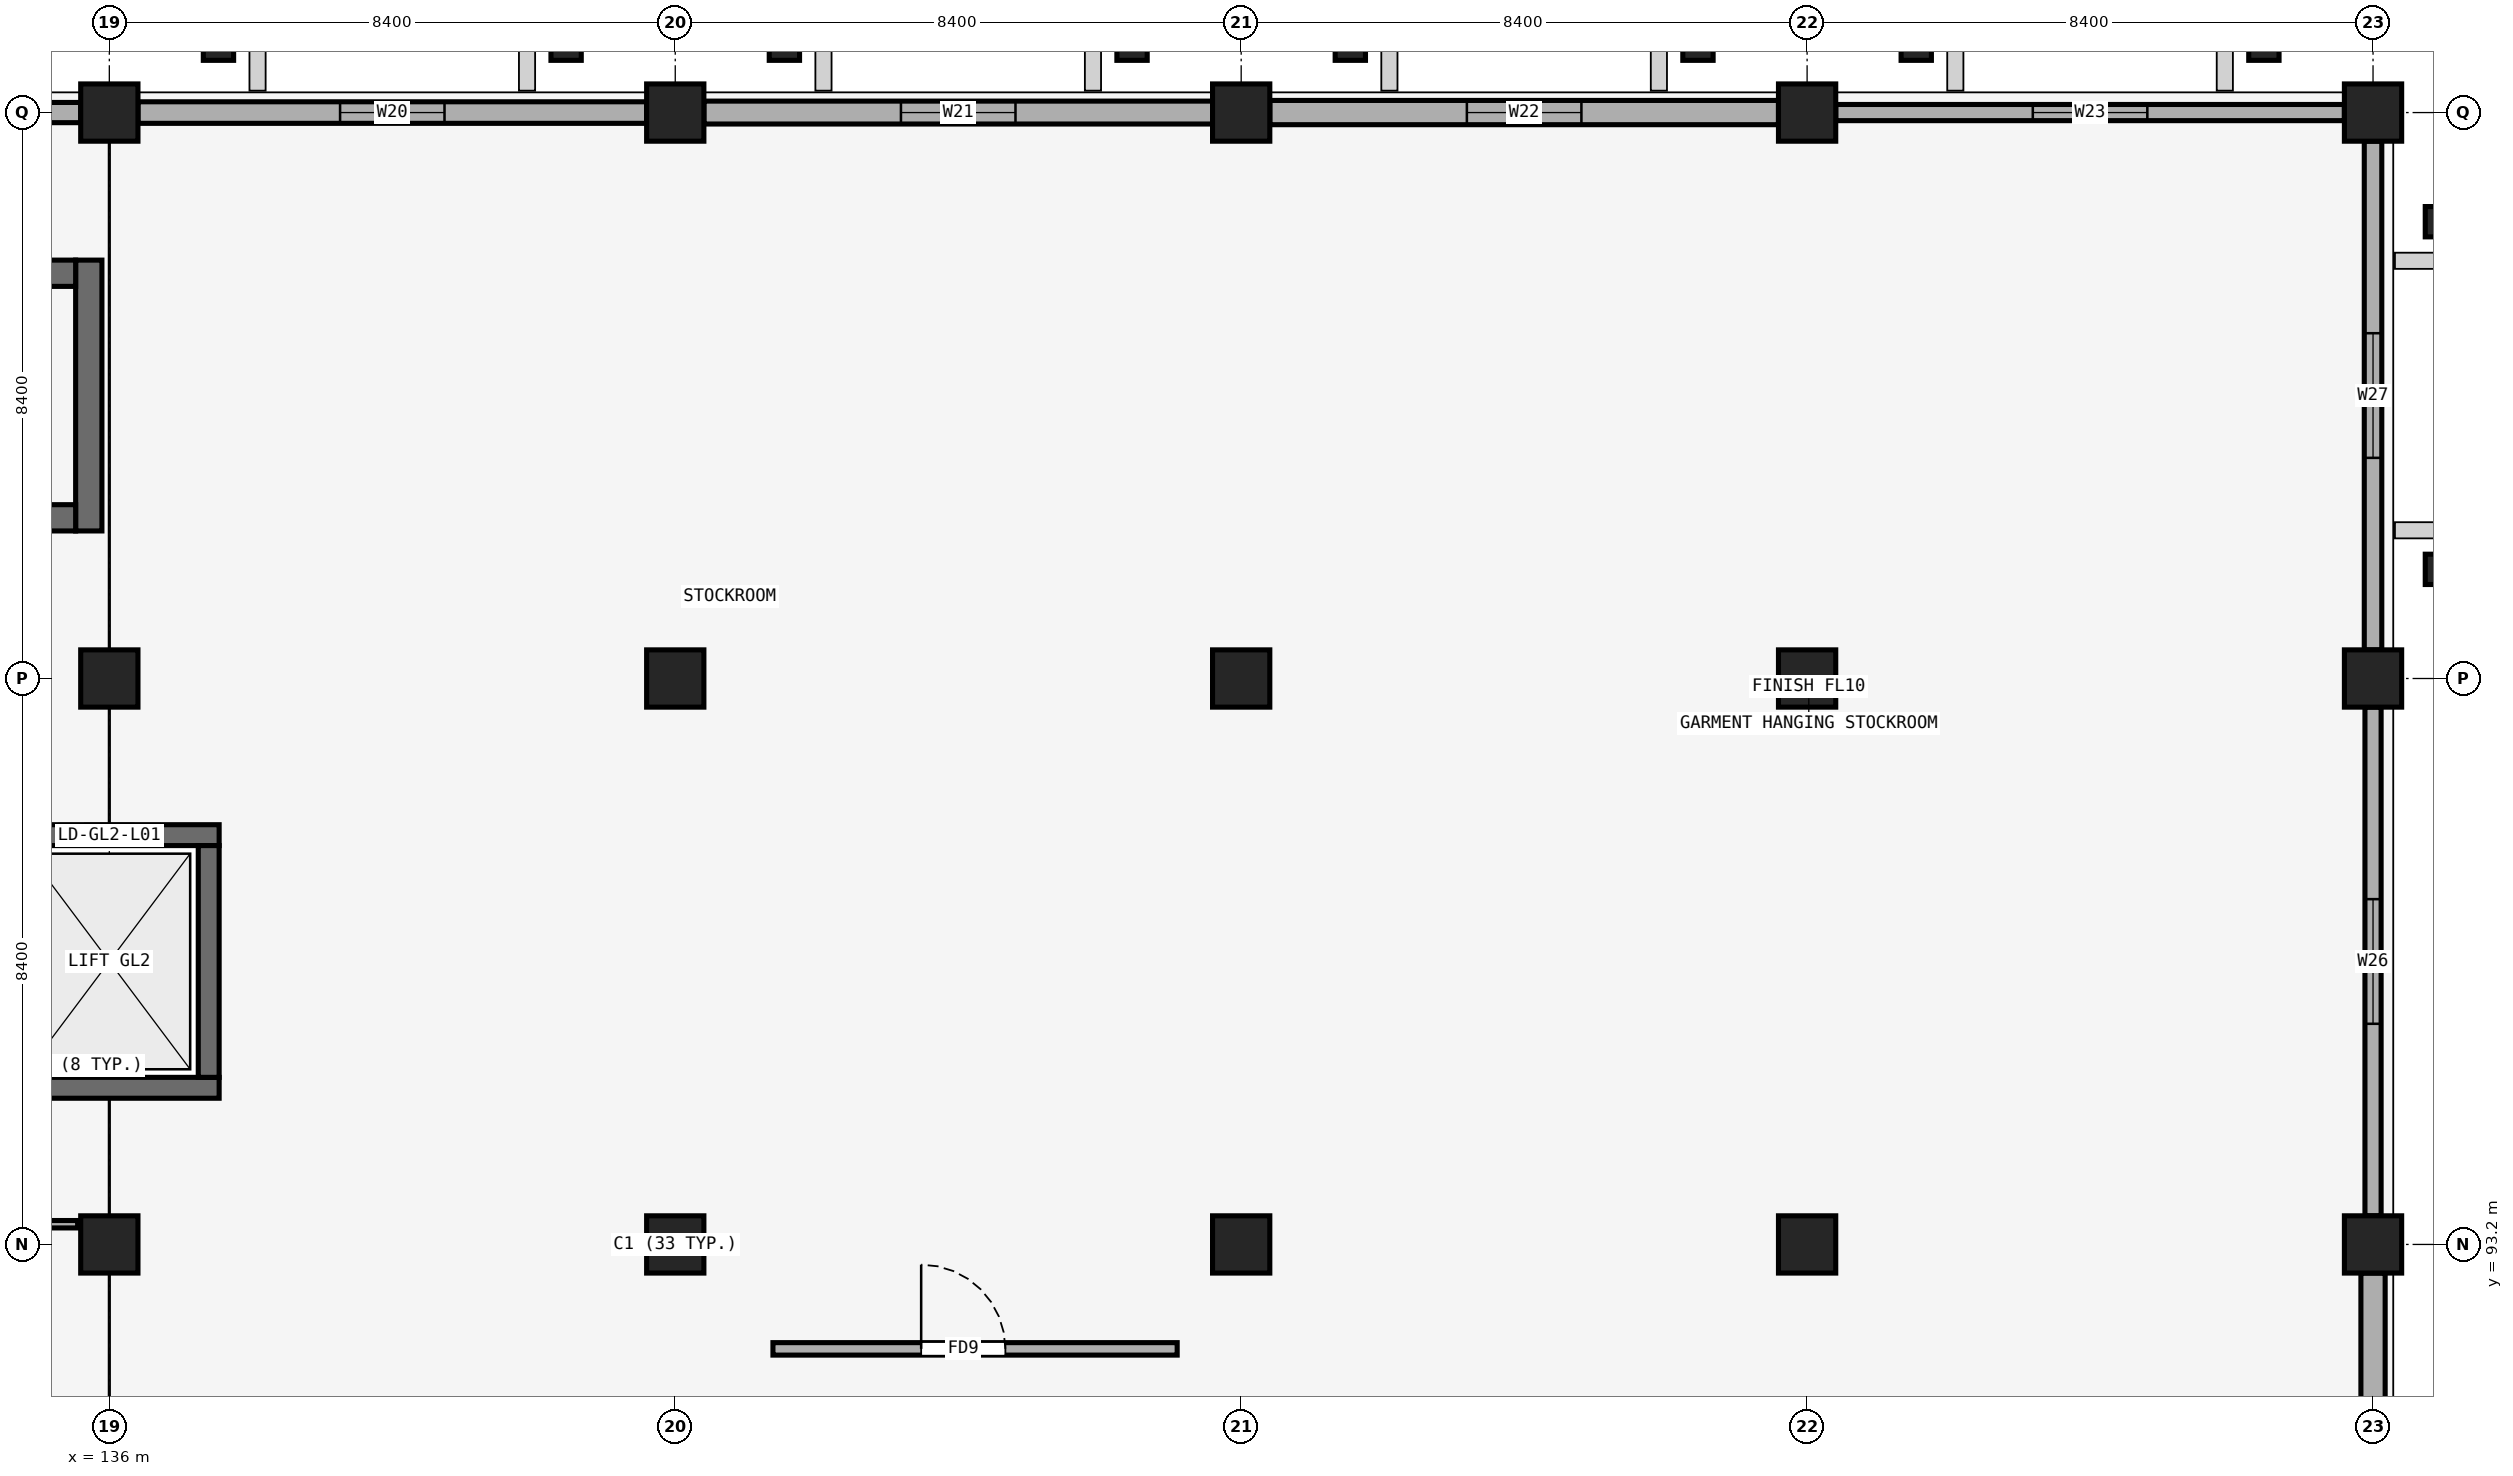
"""IFC4 building model, lengths in metres.
Left out: names, types, materials, properties, quantities, classifications, styles, units other than length and angle.
Written with IfcOpenShell. Run it as: python <this file> out.ifc"""

import sys

from ifc_helpers import new_model, si_unit, direction, frame, frame_2d, origin, origin_2d, place, context, subcontext, project, spatial, rectangle, extrude, element, fill, save


model = new_model("IFC4")
c1 = context("Model", 3, precision=1e-05, world=origin(), true_north=direction((0.0, 1.0)))
c2 = subcontext(c1, "Body", "Model", "MODEL_VIEW")
j1 = project(units=[si_unit("LENGTHUNIT", "METRE"), si_unit("PLANEANGLEUNIT", "RADIAN")], contexts=[c1])
p1 = place(None, origin())
s1 = spatial("IfcSite", under=j1, at=p1, CompositionType="ELEMENT")
p2 = place(p1, origin())
s2 = spatial("IfcBuilding", under=s1, at=p2, CompositionType="ELEMENT")
p3 = place(p2, frame((0.0, 0.0, 5.4)))
s3 = spatial("IfcBuildingStorey", under=s2, at=p3, CompositionType="ELEMENT", Elevation=5.4)
for number, where, z_axis, x_axis in (
    (1, (136.0, 93.2, 0.0), (0.0, 0.0, 1.0), (1.0, 0.0, 0.0)),
    (2, (144.4, 93.2, 0.0), (0.0, 0.0, 1.0), (1.0, 0.0, 0.0)),
    (3, (152.8, 93.2, 0.0), (0.0, 0.0, 1.0), (1.0, 0.0, 0.0)),
    (4, (161.2, 93.2, 0.0), (0.0, 0.0, 1.0), (1.0, 0.0, 0.0)),
    (5, (169.6, 93.2, 0.0), (0.0, 0.0, 1.0), (1.0, 0.0, 0.0)),
    (6, (136.0, 101.6, 0.0), (0.0, 0.0, 1.0), (1.0, 0.0, 0.0)),
    (7, (144.4, 101.6, 0.0), (0.0, 0.0, 1.0), (1.0, 0.0, 0.0)),
    (8, (152.8, 101.6, 0.0), (0.0, 0.0, 1.0), (1.0, 0.0, 0.0)),
    (9, (161.2, 101.6, 0.0), (0.0, 0.0, 1.0), (1.0, 0.0, 0.0)),
    (10, (169.6, 101.6, 0.0), (0.0, 0.0, 1.0), (1.0, 0.0, 0.0)),
    (11, (136.0, 110.0, 0.0), (0.0, 0.0, 1.0), (1.0, 0.0, 0.0)),
    (12, (144.4, 110.0, 0.0), (0.0, 0.0, 1.0), (1.0, 0.0, 0.0)),
    (13, (152.8, 110.0, 0.0), (0.0, 0.0, 1.0), (1.0, 0.0, 0.0)),
    (14, (161.2, 110.0, 0.0), (0.0, 0.0, 1.0), (1.0, 0.0, 0.0)),
    (15, (169.6, 110.0, 0.0), (0.0, 0.0, 1.0), (1.0, 0.0, 0.0)),
):
    element("IfcColumn", number, at=place(p3, frame(where, z_axis=z_axis, x_axis=x_axis)), inside=s3, PredefinedType="COLUMN", context=c2, shape_type="SweptSolid", body=[
        extrude(rectangle(XDim=0.85, YDim=0.85, at=origin_2d()), origin(), (0.0, 0.0, 1.0), 4.5),
    ])
for number, where, z_axis, x_axis in (
    (16, (137.62, 111.05, 0.0), (0.0, 0.0, 1.0), (1.0, 0.0, 0.0)),
    (17, (142.78, 111.05, 0.0), (0.0, 0.0, 1.0), (1.0, 0.0, 0.0)),
    (18, (146.02, 111.05, 0.0), (0.0, 0.0, 1.0), (1.0, 0.0, 0.0)),
    (19, (151.18, 111.05, 0.0), (0.0, 0.0, 1.0), (1.0, 0.0, 0.0)),
    (20, (154.42, 111.05, 0.0), (0.0, 0.0, 1.0), (1.0, 0.0, 0.0)),
    (21, (159.58, 111.05, 0.0), (0.0, 0.0, 1.0), (1.0, 0.0, 0.0)),
    (22, (162.82, 111.05, 0.0), (0.0, 0.0, 1.0), (1.0, 0.0, 0.0)),
    (23, (167.98, 111.05, 0.0), (0.0, 0.0, 1.0), (1.0, 0.0, 0.0)),
    (24, (170.65, 103.22, 0.0), (0.0, 0.0, 1.0), (0.0, 1.0, 0.0)),
    (25, (170.65, 108.38, 0.0), (0.0, 0.0, 1.0), (0.0, 1.0, 0.0)),
):
    element("IfcColumn", number, at=place(p3, frame(where, z_axis=z_axis, x_axis=x_axis)), inside=s3, PredefinedType="PILASTER", context=c2, shape_type="SweptSolid", body=[
        extrude(rectangle(XDim=0.45, YDim=0.55, at=origin_2d()), origin(), (0.0, 0.0, 1.0), 4.5),
    ])
p4 = place(p3, frame((128.025, 110.0, 0.0), z_axis=(0.0, 0.0, 1.0), x_axis=(1.0, 0.0, 0.0)))
e26 = element("IfcWall", 26, at=p4, inside=s3, PredefinedType="SOLIDWALL", context=c2, shape_type="SweptSolid", body=[
    extrude(rectangle(XDim=7.55, YDim=0.3, at=frame_2d((3.775, 0.0))), origin(), (0.0, 0.0, 1.0), 3.45),
])
p5 = place(p4, frame((3.0, 0.0, 0.95)))
e27 = element("IfcOpeningElement", 27, at=p5, cuts=e26, PredefinedType="OPENING", context=c2, shape_type="SweptSolid", body=[
    extrude(rectangle(XDim=1.55, YDim=1.85, at=frame_2d((0.775, 0.925))), frame((0.0, 0.16, 0.0), z_axis=(0.0, -1.0, 0.0), x_axis=(1.0, 0.0, 0.0)), (0.0, 0.0, 1.0), 0.32),
])
p6 = place(p3, frame((136.425, 110.0, 0.0), z_axis=(0.0, 0.0, 1.0), x_axis=(1.0, 0.0, 0.0)))
e28 = element("IfcWall", 28, at=p6, inside=s3, PredefinedType="SOLIDWALL", context=c2, shape_type="SweptSolid", body=[
    extrude(rectangle(XDim=7.55, YDim=0.32, at=frame_2d((3.775, 0.0))), origin(), (0.0, 0.0, 1.0), 3.45),
])
p7 = place(p6, frame((3.0, 0.0, 0.95)))
e29 = element("IfcOpeningElement", 29, at=p7, cuts=e28, PredefinedType="OPENING", context=c2, shape_type="SweptSolid", body=[
    extrude(rectangle(XDim=1.55, YDim=2.1, at=frame_2d((0.775, 1.05))), frame((0.0, 0.17, 0.0), z_axis=(0.0, -1.0, 0.0), x_axis=(1.0, 0.0, 0.0)), (0.0, 0.0, 1.0), 0.34),
])
p8 = place(p3, frame((144.825, 110.0, 0.0), z_axis=(0.0, 0.0, 1.0), x_axis=(1.0, 0.0, 0.0)))
e30 = element("IfcWall", 30, at=p8, inside=s3, PredefinedType="SOLIDWALL", context=c2, shape_type="SweptSolid", body=[
    extrude(rectangle(XDim=7.55, YDim=0.34, at=frame_2d((3.775, 0.0))), origin(), (0.0, 0.0, 1.0), 3.45),
])
p9 = place(p8, frame((2.925, 0.0, 0.95)))
e31 = element("IfcOpeningElement", 31, at=p9, cuts=e30, PredefinedType="OPENING", context=c2, shape_type="SweptSolid", body=[
    extrude(rectangle(XDim=1.7, YDim=1.35, at=frame_2d((0.85, 0.675))), frame((0.0, 0.18, 0.0), z_axis=(0.0, -1.0, 0.0), x_axis=(1.0, 0.0, 0.0)), (0.0, 0.0, 1.0), 0.36),
])
p10 = place(p3, frame((153.225, 110.0, 0.0), z_axis=(0.0, 0.0, 1.0), x_axis=(1.0, 0.0, 0.0)))
e32 = element("IfcWall", 32, at=p10, inside=s3, PredefinedType="SOLIDWALL", context=c2, shape_type="SweptSolid", body=[
    extrude(rectangle(XDim=7.55, YDim=0.36, at=frame_2d((3.775, 0.0))), origin(), (0.0, 0.0, 1.0), 3.45),
])
p11 = place(p10, frame((2.925, 0.0, 0.95)))
e33 = element("IfcOpeningElement", 33, at=p11, cuts=e32, PredefinedType="OPENING", context=c2, shape_type="SweptSolid", body=[
    extrude(rectangle(XDim=1.7, YDim=1.6, at=frame_2d((0.85, 0.8))), frame((0.0, 0.19, 0.0), z_axis=(0.0, -1.0, 0.0), x_axis=(1.0, 0.0, 0.0)), (0.0, 0.0, 1.0), 0.38),
])
p12 = place(p3, frame((161.625, 110.0, 0.0), z_axis=(0.0, 0.0, 1.0), x_axis=(1.0, 0.0, 0.0)))
e34 = element("IfcWall", 34, at=p12, inside=s3, PredefinedType="SOLIDWALL", context=c2, shape_type="SweptSolid", body=[
    extrude(rectangle(XDim=7.55, YDim=0.24, at=frame_2d((3.775, 0.0))), origin(), (0.0, 0.0, 1.0), 3.45),
])
p13 = place(p12, frame((2.925, 0.0, 0.95)))
e35 = element("IfcOpeningElement", 35, at=p13, cuts=e34, PredefinedType="OPENING", context=c2, shape_type="SweptSolid", body=[
    extrude(rectangle(XDim=1.7, YDim=1.85, at=frame_2d((0.85, 0.925))), frame((0.0, 0.13, 0.0), z_axis=(0.0, -1.0, 0.0), x_axis=(1.0, 0.0, 0.0)), (0.0, 0.0, 1.0), 0.26),
])
p14 = place(p3, frame((169.6, 85.225, 0.0), z_axis=(0.0, 0.0, 1.0), x_axis=(0.0, 1.0, 0.0)))
e36 = element("IfcWall", 36, at=p14, inside=s3, PredefinedType="SOLIDWALL", context=c2, shape_type="SweptSolid", body=[
    extrude(rectangle(XDim=7.55, YDim=0.36, at=frame_2d((3.775, 0.0))), origin(), (0.0, 0.0, 1.0), 3.45),
])
p15 = place(p14, frame((2.85, 0.0, 0.95)))
e37 = element("IfcOpeningElement", 37, at=p15, cuts=e36, PredefinedType="OPENING", context=c2, shape_type="SweptSolid", body=[
    extrude(rectangle(XDim=1.85, YDim=1.35, at=frame_2d((0.925, 0.675))), frame((0.0, 0.19, 0.0), z_axis=(0.0, -1.0, 0.0), x_axis=(1.0, 0.0, 0.0)), (0.0, 0.0, 1.0), 0.38),
])
p16 = place(p3, frame((169.6, 93.625, 0.0), z_axis=(0.0, 0.0, 1.0), x_axis=(0.0, 1.0, 0.0)))
e38 = element("IfcWall", 38, at=p16, inside=s3, PredefinedType="SOLIDWALL", context=c2, shape_type="SweptSolid", body=[
    extrude(rectangle(XDim=7.55, YDim=0.24, at=frame_2d((3.775, 0.0))), origin(), (0.0, 0.0, 1.0), 3.45),
])
p17 = place(p16, frame((2.85, 0.0, 0.95)))
e39 = element("IfcOpeningElement", 39, at=p17, cuts=e38, PredefinedType="OPENING", context=c2, shape_type="SweptSolid", body=[
    extrude(rectangle(XDim=1.85, YDim=1.6, at=frame_2d((0.925, 0.8))), frame((0.0, 0.13, 0.0), z_axis=(0.0, -1.0, 0.0), x_axis=(1.0, 0.0, 0.0)), (0.0, 0.0, 1.0), 0.26),
])
p18 = place(p3, frame((169.6, 102.025, 0.0), z_axis=(0.0, 0.0, 1.0), x_axis=(0.0, 1.0, 0.0)))
e40 = element("IfcWall", 40, at=p18, inside=s3, PredefinedType="SOLIDWALL", context=c2, shape_type="SweptSolid", body=[
    extrude(rectangle(XDim=7.55, YDim=0.26, at=frame_2d((3.775, 0.0))), origin(), (0.0, 0.0, 1.0), 3.45),
])
p19 = place(p18, frame((2.85, 0.0, 0.95)))
e41 = element("IfcOpeningElement", 41, at=p19, cuts=e40, PredefinedType="OPENING", context=c2, shape_type="SweptSolid", body=[
    extrude(rectangle(XDim=1.85, YDim=1.85, at=frame_2d((0.925, 0.925))), frame((0.0, 0.14, 0.0), z_axis=(0.0, -1.0, 0.0), x_axis=(1.0, 0.0, 0.0)), (0.0, 0.0, 1.0), 0.28),
])
p20 = place(p3, frame((135.695, 103.79, 0.0), z_axis=(0.0, 0.0, 1.0), x_axis=(0.0, 1.0, 0.0)))
e42 = element("IfcWall", 42, at=p20, inside=s3, PredefinedType="SHEAR", context=c2, shape_type="SweptSolid", body=[
    extrude(rectangle(XDim=4.02, YDim=0.39, at=frame_2d((2.01, 0.0))), origin(), (0.0, 0.0, 1.0), 4.2),
])
for number, where, z_axis, x_axis in (
    (43, (128.1, 103.985, 0.0), (0.0, 0.0, 1.0), (1.0, 0.0, 0.0)),
    (44, (128.1, 107.615, 0.0), (0.0, 0.0, 1.0), (1.0, 0.0, 0.0)),
):
    element("IfcWall", number, at=place(p3, frame(where, z_axis=z_axis, x_axis=x_axis)), inside=s3, PredefinedType="SHEAR", context=c2, shape_type="SweptSolid", body=[
        extrude(rectangle(XDim=7.4, YDim=0.39, at=frame_2d((3.7, 0.0))), origin(), (0.0, 0.0, 1.0), 4.2),
    ])
p21 = place(p3, frame((134.37, 95.525, 0.0), z_axis=(0.0, 0.0, 1.0), x_axis=(1.0, 0.0, 0.0)))
e45 = element("IfcWall", 45, at=p21, inside=s3, PredefinedType="SHEAR", context=c2, shape_type="SweptSolid", body=[
    extrude(rectangle(XDim=3.26, YDim=0.31, at=frame_2d((1.63, 0.0))), origin(), (0.0, 0.0, 1.0), 4.2),
])
p22 = place(p3, frame((134.37, 99.275, 0.0), z_axis=(0.0, 0.0, 1.0), x_axis=(1.0, 0.0, 0.0)))
e46 = element("IfcWall", 46, at=p22, inside=s3, PredefinedType="SHEAR", context=c2, shape_type="SweptSolid", body=[
    extrude(rectangle(XDim=3.26, YDim=0.31, at=frame_2d((1.63, 0.0))), origin(), (0.0, 0.0, 1.0), 4.2),
])
p23 = place(p22, frame((0.88, 0.0, 0.0)))
e47 = element("IfcOpeningElement", 47, at=p23, cuts=e46, PredefinedType="OPENING", context=c2, shape_type="SweptSolid", body=[
    extrude(rectangle(XDim=1.5, YDim=2.35, at=frame_2d((0.75, 1.175))), frame((0.0, 0.165, 0.0), z_axis=(0.0, -1.0, 0.0), x_axis=(1.0, 0.0, 0.0)), (0.0, 0.0, 1.0), 0.33),
])
p24 = place(p3, frame((137.475, 95.68, 0.0), z_axis=(0.0, 0.0, 1.0), x_axis=(0.0, 1.0, 0.0)))
e48 = element("IfcWall", 48, at=p24, inside=s3, PredefinedType="SHEAR", context=c2, shape_type="SweptSolid", body=[
    extrude(rectangle(XDim=3.44, YDim=0.31, at=frame_2d((1.72, 0.0))), origin(), (0.0, 0.0, 1.0), 4.2),
])
p25 = place(p3, frame((129.32, 93.5, 0.0), z_axis=(0.0, 0.0, 1.0), x_axis=(1.0, 0.0, 0.0)))
e49 = element("IfcWall", 49, at=p25, inside=s3, PredefinedType="PARTITIONING", context=c2, shape_type="SweptSolid", body=[
    extrude(rectangle(XDim=6.21, YDim=0.11, at=frame_2d((3.105, 0.0))), origin(), (0.0, 0.0, 1.0), 4.2),
])
p26 = place(p3, frame((145.85, 91.65, 0.0), z_axis=(0.0, 0.0, 1.0), x_axis=(1.0, 0.0, 0.0)))
e50 = element("IfcWall", 50, at=p26, inside=s3, PredefinedType="PARTITIONING", context=c2, shape_type="SweptSolid", body=[
    extrude(rectangle(XDim=6.0, YDim=0.185, at=frame_2d((3.0, 0.0))), origin(), (0.0, 0.0, 1.0), 4.2),
])
p27 = place(p26, frame((2.2, 0.0, 0.0)))
e51 = element("IfcOpeningElement", 51, at=p27, cuts=e50, PredefinedType="OPENING", context=c2, shape_type="SweptSolid", body=[
    extrude(rectangle(XDim=1.25, YDim=2.25, at=frame_2d((0.625, 1.125))), frame((0.0, 0.103, 0.0), z_axis=(0.0, -1.0, 0.0), x_axis=(1.0, 0.0, 0.0)), (0.0, 0.0, 1.0), 0.205),
])
p28 = place(p7, origin())
e52 = element("IfcWindow", 52, at=p28, inside=s3, PartitioningType="SINGLE_PANEL", PredefinedType="WINDOW", context=c2, shape_type="SweptSolid", body=[
    extrude(rectangle(XDim=1.55, YDim=2.1, at=frame_2d((0.775, 1.05))), frame((0.0, 0.03, 0.0), z_axis=(0.0, -1.0, 0.0), x_axis=(1.0, 0.0, 0.0)), (0.0, 0.0, 1.0), 0.06),
])
fill(e29, e52)
p29 = place(p9, origin())
e53 = element("IfcWindow", 53, at=p29, inside=s3, PartitioningType="DOUBLE_PANEL_VERTICAL", PredefinedType="WINDOW", context=c2, shape_type="SweptSolid", body=[
    extrude(rectangle(XDim=1.7, YDim=1.35, at=frame_2d((0.85, 0.675))), frame((0.0, 0.03, 0.0), z_axis=(0.0, -1.0, 0.0), x_axis=(1.0, 0.0, 0.0)), (0.0, 0.0, 1.0), 0.06),
])
fill(e31, e53)
p30 = place(p11, origin())
e54 = element("IfcWindow", 54, at=p30, inside=s3, PartitioningType="DOUBLE_PANEL_VERTICAL", PredefinedType="WINDOW", context=c2, shape_type="SweptSolid", body=[
    extrude(rectangle(XDim=1.7, YDim=1.6, at=frame_2d((0.85, 0.8))), frame((0.0, 0.03, 0.0), z_axis=(0.0, -1.0, 0.0), x_axis=(1.0, 0.0, 0.0)), (0.0, 0.0, 1.0), 0.06),
])
fill(e33, e54)
p31 = place(p13, origin())
e55 = element("IfcWindow", 55, at=p31, inside=s3, PartitioningType="DOUBLE_PANEL_VERTICAL", PredefinedType="WINDOW", context=c2, shape_type="SweptSolid", body=[
    extrude(rectangle(XDim=1.7, YDim=1.85, at=frame_2d((0.85, 0.925))), frame((0.0, 0.03, 0.0), z_axis=(0.0, -1.0, 0.0), x_axis=(1.0, 0.0, 0.0)), (0.0, 0.0, 1.0), 0.06),
])
fill(e35, e55)
p32 = place(p17, origin())
e56 = element("IfcWindow", 56, at=p32, inside=s3, PartitioningType="DOUBLE_PANEL_VERTICAL", PredefinedType="WINDOW", context=c2, shape_type="SweptSolid", body=[
    extrude(rectangle(XDim=1.85, YDim=1.6, at=frame_2d((0.925, 0.8))), frame((0.0, 0.03, 0.0), z_axis=(0.0, -1.0, 0.0), x_axis=(1.0, 0.0, 0.0)), (0.0, 0.0, 1.0), 0.06),
])
fill(e39, e56)
p33 = place(p19, origin())
e57 = element("IfcWindow", 57, at=p33, inside=s3, PartitioningType="DOUBLE_PANEL_VERTICAL", PredefinedType="WINDOW", context=c2, shape_type="SweptSolid", body=[
    extrude(rectangle(XDim=1.85, YDim=1.85, at=frame_2d((0.925, 0.925))), frame((0.0, 0.03, 0.0), z_axis=(0.0, -1.0, 0.0), x_axis=(1.0, 0.0, 0.0)), (0.0, 0.0, 1.0), 0.06),
])
fill(e41, e57)
p34 = place(p23, origin())
e58 = element("IfcDoor", 58, at=p34, inside=s3, OperationType="SLIDING_TO_LEFT", PredefinedType="DOOR", context=c2, shape_type="SweptSolid", body=[
    extrude(rectangle(XDim=1.5, YDim=2.35, at=frame_2d((0.75, 1.175))), frame((0.0, 0.025, 0.0), z_axis=(0.0, -1.0, 0.0), x_axis=(1.0, 0.0, 0.0)), (0.0, 0.0, 1.0), 0.05),
])
fill(e47, e58)
p35 = place(p27, origin())
e59 = element("IfcDoor", 59, at=p35, inside=s3, OperationType="SINGLE_SWING_LEFT", PredefinedType="DOOR", context=c2, shape_type="SweptSolid", body=[
    extrude(rectangle(XDim=1.25, YDim=2.25, at=frame_2d((0.625, 1.125))), frame((0.0, 0.025, 0.0), z_axis=(0.0, -1.0, 0.0), x_axis=(1.0, 0.0, 0.0)), (0.0, 0.0, 1.0), 0.05),
])
fill(e51, e59)
save(model, sys.argv[1])
